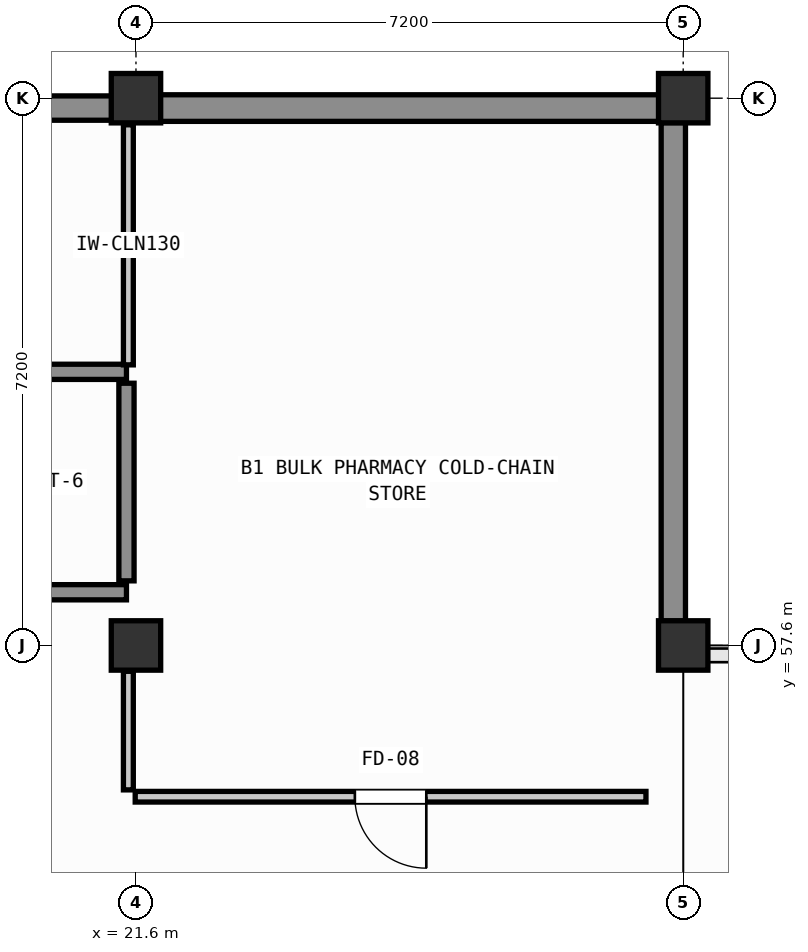
"""IFC4 building model, lengths in metres.
Left out: names, types, materials, properties, quantities, classifications, styles, units other than length and angle.
Written with IfcOpenShell. Run it as: python <this file> out.ifc"""

import sys

from ifc_helpers import new_model, si_unit, direction, frame, frame_2d, origin, origin_2d, place, context, subcontext, project, spatial, rectangle, extrude, element, fill, save


model = new_model("IFC4")
c1 = context("Model", 3, precision=1e-05, world=origin(), true_north=direction((0.0, 1.0)))
c2 = subcontext(c1, "Body", "Model", "MODEL_VIEW")
j1 = project(units=[si_unit("LENGTHUNIT", "METRE"), si_unit("PLANEANGLEUNIT", "RADIAN")], contexts=[c1])
p1 = place(None, origin())
s1 = spatial("IfcSite", under=j1, at=p1, CompositionType="ELEMENT")
p2 = place(p1, origin())
s2 = spatial("IfcBuilding", under=s1, at=p2, CompositionType="ELEMENT")
p3 = place(p2, frame((0.0, 0.0, -4.5)))
s3 = spatial("IfcBuildingStorey", under=s2, at=p3, CompositionType="ELEMENT", Elevation=-4.5)
for number, where, z_axis, x_axis in (
    (1, (21.6, 57.6, -0.5), (0.0, 0.0, 1.0), (1.0, 0.0, 0.0)),
    (2, (21.6, 64.8, -0.5), (0.0, 0.0, 1.0), (1.0, 0.0, 0.0)),
    (3, (28.8, 57.6, -0.5), (0.0, 0.0, 1.0), (1.0, 0.0, 0.0)),
    (4, (28.8, 64.8, -0.5), (0.0, 0.0, 1.0), (1.0, 0.0, 0.0)),
):
    element("IfcColumn", number, at=place(p3, frame(where, z_axis=z_axis, x_axis=x_axis)), inside=s3, PredefinedType="COLUMN", context=c2, shape_type="SweptSolid", body=[
        extrude(rectangle(XDim=0.65, YDim=0.65, at=origin_2d()), origin(), (0.0, 0.0, 1.0), 4.75),
    ])
p4 = place(p3, frame((14.72, 64.67, 0.0), z_axis=(0.0, 0.0, 1.0), x_axis=(1.0, 0.0, 0.0)))
e5 = element("IfcWall", 5, at=p4, inside=s3, PredefinedType="SOLIDWALL", context=c2, shape_type="SweptSolid", body=[
    extrude(rectangle(XDim=6.56, YDim=0.32, at=frame_2d((3.28, 0.0))), origin(), (0.0, 0.0, 1.0), 4.25),
])
p5 = place(p3, frame((21.92, 64.67, 0.0), z_axis=(0.0, 0.0, 1.0), x_axis=(1.0, 0.0, 0.0)))
e6 = element("IfcWall", 6, at=p5, inside=s3, PredefinedType="SOLIDWALL", context=c2, shape_type="SweptSolid", body=[
    extrude(rectangle(XDim=6.56, YDim=0.35, at=frame_2d((3.28, 0.0))), origin(), (0.0, 0.0, 1.0), 4.25),
])
p6 = place(p3, frame((28.67, 64.48, 0.0), z_axis=(0.0, 0.0, 1.0), x_axis=(0.0, -1.0, 0.0)))
e7 = element("IfcWall", 7, at=p6, inside=s3, PredefinedType="SOLIDWALL", context=c2, shape_type="SweptSolid", body=[
    extrude(rectangle(XDim=6.56, YDim=0.32, at=frame_2d((3.28, 0.0))), origin(), (0.0, 0.0, 1.0), 4.25),
])
p7 = place(p3, frame((14.7, 58.3, -0.5), z_axis=(0.0, 0.0, 1.0), x_axis=(1.0, 0.0, 0.0)))
e8 = element("IfcWall", 8, at=p7, inside=s3, PredefinedType="SHEAR", context=c2, shape_type="SweptSolid", body=[
    extrude(rectangle(XDim=6.775, YDim=0.2, at=frame_2d((3.388, 0.0))), origin(), (0.0, 0.0, 1.0), 5.0),
])
p8 = place(p7, frame((0.22, 0.0, 0.5)))
e9 = element("IfcOpeningElement", 9, at=p8, cuts=e8, PredefinedType="OPENING", context=c2, shape_type="SweptSolid", body=[
    extrude(rectangle(XDim=1.12, YDim=2.14, at=frame_2d((0.56, 1.07))), frame((0.0, 0.11, 0.0), z_axis=(0.0, -1.0, 0.0), x_axis=(1.0, 0.0, 0.0)), (0.0, 0.0, 1.0), 0.22),
])
p9 = place(p3, frame((14.7, 61.2, -0.5), z_axis=(0.0, 0.0, 1.0), x_axis=(1.0, 0.0, 0.0)))
e10 = element("IfcWall", 10, at=p9, inside=s3, PredefinedType="SHEAR", context=c2, shape_type="SweptSolid", body=[
    extrude(rectangle(XDim=6.775, YDim=0.2, at=frame_2d((3.388, 0.0))), origin(), (0.0, 0.0, 1.0), 5.0),
])
p10 = place(p3, frame((21.475, 58.45, -0.5), z_axis=(0.0, 0.0, 1.0), x_axis=(0.0, 1.0, 0.0)))
e11 = element("IfcWall", 11, at=p10, inside=s3, PredefinedType="SHEAR", context=c2, shape_type="SweptSolid", body=[
    extrude(rectangle(XDim=2.6, YDim=0.2, at=frame_2d((1.3, 0.0))), origin(), (0.0, 0.0, 1.0), 5.0),
])
p11 = place(p3, frame((28.31, 55.61, 0.0), z_axis=(0.0, 0.0, 1.0), x_axis=(-1.0, 0.0, 0.0)))
e12 = element("IfcWall", 12, at=p11, inside=s3, PredefinedType="PARTITIONING", context=c2, shape_type="SweptSolid", body=[
    extrude(rectangle(XDim=6.72, YDim=0.14, at=frame_2d((3.36, 0.0))), origin(), (0.0, 0.0, 1.0), 3.55),
])
p12 = place(p11, frame((2.89, 0.0, 0.0)))
e13 = element("IfcOpeningElement", 13, at=p12, cuts=e12, PredefinedType="OPENING", context=c2, shape_type="SweptSolid", body=[
    extrude(rectangle(XDim=0.94, YDim=2.1, at=frame_2d((0.47, 1.05))), frame((0.0, 0.08, 0.0), z_axis=(0.0, -1.0, 0.0), x_axis=(1.0, 0.0, 0.0)), (0.0, 0.0, 1.0), 0.16),
])
p13 = place(p3, frame((21.5, 55.7, 0.0), z_axis=(0.0, 0.0, 1.0), x_axis=(0.0, 1.0, 0.0)))
e14 = element("IfcWall", 14, at=p13, inside=s3, PredefinedType="PARTITIONING", context=c2, shape_type="SweptSolid", body=[
    extrude(rectangle(XDim=1.56, YDim=0.13, at=frame_2d((0.78, 0.0))), origin(), (0.0, 0.0, 1.0), 3.4),
])
p14 = place(p3, frame((21.5, 61.292, 0.0), z_axis=(0.0, 0.0, 1.0), x_axis=(0.0, 1.0, 0.0)))
e15 = element("IfcWall", 15, at=p14, inside=s3, PredefinedType="PARTITIONING", context=c2, shape_type="SweptSolid", body=[
    extrude(rectangle(XDim=3.158, YDim=0.13, at=frame_2d((1.579, 0.0))), origin(), (0.0, 0.0, 1.0), 3.4),
])
p15 = place(p12, origin())
e16 = element("IfcDoor", 16, at=p15, inside=s3, OperationType="SINGLE_SWING_LEFT", PredefinedType="DOOR", context=c2, shape_type="SweptSolid", body=[
    extrude(rectangle(XDim=0.94, YDim=2.1, at=frame_2d((0.47, 1.05))), frame((0.0, 0.025, 0.0), z_axis=(0.0, -1.0, 0.0), x_axis=(1.0, 0.0, 0.0)), (0.0, 0.0, 1.0), 0.05),
])
fill(e13, e16)
save(model, sys.argv[1])
